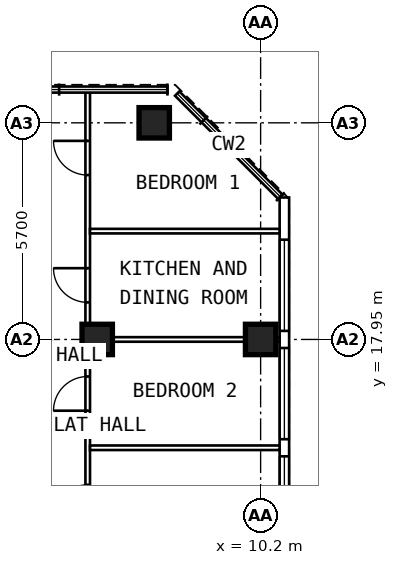
"""IFC4 building model, lengths in metres.
Left out: names, types, materials, properties, quantities, classifications, styles, units other than length and angle.
Written with IfcOpenShell. Run it as: python <this file> out.ifc"""

import sys

from ifc_helpers import new_model, si_unit, direction, frame, frame_2d, origin, origin_2d, place, context, subcontext, project, spatial, rectangle, extrude, element, fill, save


model = new_model("IFC4")
c1 = context("Model", 3, precision=1e-05, world=origin(), true_north=direction((0.0, 1.0)))
c2 = subcontext(c1, "Body", "Model", "MODEL_VIEW")
j1 = project(units=[si_unit("LENGTHUNIT", "METRE"), si_unit("PLANEANGLEUNIT", "RADIAN")], contexts=[c1])
p1 = place(None, origin())
s1 = spatial("IfcSite", under=j1, at=p1, CompositionType="ELEMENT")
p2 = place(p1, origin())
s2 = spatial("IfcBuilding", under=s1, at=p2, CompositionType="ELEMENT")
p3 = place(p2, frame((0.0, 0.0, 292.6)))
s3 = spatial("IfcBuildingStorey", under=s2, at=p3, CompositionType="ELEMENT", Elevation=292.6)
for number, where, z_axis, x_axis in (
    (1, (10.2, 17.95, 0.0), (0.0, 0.0, 1.0), (0.0, 1.0, 0.0)),
    (2, (7.4, 23.65, 0.0), (0.0, 0.0, 1.0), (0.0, 1.0, 0.0)),
    (3, (5.9, 17.95, 0.0), (0.0, 0.0, 1.0), (0.0, 1.0, 0.0)),
):
    element("IfcColumn", number, at=place(p3, frame(where, z_axis=z_axis, x_axis=x_axis)), inside=s3, PredefinedType="COLUMN", context=c2, shape_type="SweptSolid", body=[
        extrude(rectangle(XDim=0.8, YDim=0.8, at=origin_2d()), origin(), (0.0, 0.0, 1.0), 3.6),
    ])
p4 = place(p3, frame((10.825, 6.409, 0.0), z_axis=(0.0, 0.0, 1.0), x_axis=(0.0, 1.0, 0.0)))
e4 = element("IfcWall", 4, at=p4, inside=s3, PredefinedType="SOLIDWALL", context=c2, shape_type="SweptSolid", body=[
    extrude(rectangle(XDim=15.276, YDim=0.25, at=frame_2d((7.638, 0.0))), origin(), (0.0, 0.0, 1.0), 3.35),
])
p5 = place(p4, frame((0.366, 0.0, 0.6)))
e5 = element("IfcOpeningElement", 5, at=p5, cuts=e4, PredefinedType="OPENING", context=c2, shape_type="SweptSolid", body=[
    extrude(rectangle(XDim=2.4, YDim=2.0, at=frame_2d((1.2, 1.0))), frame((0.0, 0.137, 0.0), z_axis=(0.0, -1.0, 0.0), x_axis=(1.0, 0.0, 0.0)), (0.0, 0.0, 1.0), 0.274),
])
p6 = place(p4, frame((3.216, 0.0, 0.6)))
e6 = element("IfcOpeningElement", 6, at=p6, cuts=e4, PredefinedType="OPENING", context=c2, shape_type="SweptSolid", body=[
    extrude(rectangle(XDim=2.4, YDim=2.0, at=frame_2d((1.2, 1.0))), frame((0.0, 0.137, 0.0), z_axis=(0.0, -1.0, 0.0), x_axis=(1.0, 0.0, 0.0)), (0.0, 0.0, 1.0), 0.274),
])
p7 = place(p4, frame((6.066, 0.0, 0.6)))
e7 = element("IfcOpeningElement", 7, at=p7, cuts=e4, PredefinedType="OPENING", context=c2, shape_type="SweptSolid", body=[
    extrude(rectangle(XDim=2.4, YDim=2.0, at=frame_2d((1.2, 1.0))), frame((0.0, 0.137, 0.0), z_axis=(0.0, -1.0, 0.0), x_axis=(1.0, 0.0, 0.0)), (0.0, 0.0, 1.0), 0.274),
])
p8 = place(p4, frame((8.916, 0.0, 0.6)))
e8 = element("IfcOpeningElement", 8, at=p8, cuts=e4, PredefinedType="OPENING", context=c2, shape_type="SweptSolid", body=[
    extrude(rectangle(XDim=2.4, YDim=2.0, at=frame_2d((1.2, 1.0))), frame((0.0, 0.137, 0.0), z_axis=(0.0, -1.0, 0.0), x_axis=(1.0, 0.0, 0.0)), (0.0, 0.0, 1.0), 0.274),
])
p9 = place(p4, frame((11.766, 0.0, 0.6)))
e9 = element("IfcOpeningElement", 9, at=p9, cuts=e4, PredefinedType="OPENING", context=c2, shape_type="SweptSolid", body=[
    extrude(rectangle(XDim=2.4, YDim=2.0, at=frame_2d((1.2, 1.0))), frame((0.0, 0.137, 0.0), z_axis=(0.0, -1.0, 0.0), x_axis=(1.0, 0.0, 0.0)), (0.0, 0.0, 1.0), 0.274),
])
p10 = place(p3, frame((5.65, 9.6, 0.0), z_axis=(0.0, 0.0, 1.0), x_axis=(0.0, 1.0, 0.0)))
e10 = element("IfcWall", 10, at=p10, inside=s3, PredefinedType="PARTITIONING", context=c2, shape_type="SweptSolid", body=[
    extrude(rectangle(XDim=14.845, YDim=0.12, at=frame_2d((7.422, 0.0))), origin(), (0.0, 0.0, 1.0), 3.35),
])
p11 = place(p10, frame((1.075, 0.0, 0.0)))
e11 = element("IfcOpeningElement", 11, at=p11, cuts=e10, PredefinedType="OPENING", context=c2, shape_type="SweptSolid", body=[
    extrude(rectangle(XDim=0.9, YDim=2.1, at=frame_2d((0.45, 1.05))), frame((0.0, 0.072, 0.0), z_axis=(0.0, -1.0, 0.0), x_axis=(1.0, 0.0, 0.0)), (0.0, 0.0, 1.0), 0.144),
])
p12 = place(p10, frame((3.625, 0.0, 0.0)))
e12 = element("IfcOpeningElement", 12, at=p12, cuts=e10, PredefinedType="OPENING", context=c2, shape_type="SweptSolid", body=[
    extrude(rectangle(XDim=0.9, YDim=2.1, at=frame_2d((0.45, 1.05))), frame((0.0, 0.072, 0.0), z_axis=(0.0, -1.0, 0.0), x_axis=(1.0, 0.0, 0.0)), (0.0, 0.0, 1.0), 0.144),
])
p13 = place(p10, frame((6.475, 0.0, 0.0)))
e13 = element("IfcOpeningElement", 13, at=p13, cuts=e10, PredefinedType="OPENING", context=c2, shape_type="SweptSolid", body=[
    extrude(rectangle(XDim=0.9, YDim=2.1, at=frame_2d((0.45, 1.05))), frame((0.0, 0.072, 0.0), z_axis=(0.0, -1.0, 0.0), x_axis=(1.0, 0.0, 0.0)), (0.0, 0.0, 1.0), 0.144),
])
p14 = place(p10, frame((9.325, 0.0, 0.0)))
e14 = element("IfcOpeningElement", 14, at=p14, cuts=e10, PredefinedType="OPENING", context=c2, shape_type="SweptSolid", body=[
    extrude(rectangle(XDim=0.9, YDim=2.1, at=frame_2d((0.45, 1.05))), frame((0.0, 0.072, 0.0), z_axis=(0.0, -1.0, 0.0), x_axis=(1.0, 0.0, 0.0)), (0.0, 0.0, 1.0), 0.144),
])
p15 = place(p10, frame((12.675, 0.0, 0.0)))
e15 = element("IfcOpeningElement", 15, at=p15, cuts=e10, PredefinedType="OPENING", context=c2, shape_type="SweptSolid", body=[
    extrude(rectangle(XDim=0.9, YDim=2.1, at=frame_2d((0.45, 1.05))), frame((0.0, 0.072, 0.0), z_axis=(0.0, -1.0, 0.0), x_axis=(1.0, 0.0, 0.0)), (0.0, 0.0, 1.0), 0.144),
])
p16 = place(p3, frame((5.71, 15.1, 0.0), z_axis=(0.0, 0.0, 1.0), x_axis=(1.0, 0.0, 0.0)))
e16 = element("IfcWall", 16, at=p16, inside=s3, PredefinedType="PARTITIONING", context=c2, shape_type="SweptSolid", body=[
    extrude(rectangle(XDim=4.99, YDim=0.12, at=frame_2d((2.495, 0.0))), origin(), (0.0, 0.0, 1.0), 3.35),
])
p17 = place(p3, frame((5.71, 17.95, 0.0), z_axis=(0.0, 0.0, 1.0), x_axis=(1.0, 0.0, 0.0)))
e17 = element("IfcWall", 17, at=p17, inside=s3, PredefinedType="PARTITIONING", context=c2, shape_type="SweptSolid", body=[
    extrude(rectangle(XDim=4.99, YDim=0.12, at=frame_2d((2.495, 0.0))), origin(), (0.0, 0.0, 1.0), 2.45),
])
p18 = place(p3, frame((5.71, 20.8, 0.0), z_axis=(0.0, 0.0, 1.0), x_axis=(1.0, 0.0, 0.0)))
e18 = element("IfcWall", 18, at=p18, inside=s3, PredefinedType="PARTITIONING", context=c2, shape_type="SweptSolid", body=[
    extrude(rectangle(XDim=4.99, YDim=0.12, at=frame_2d((2.495, 0.0))), origin(), (0.0, 0.0, 1.0), 3.35),
])
p19 = place(p7, origin())
e19 = element("IfcWindow", 19, at=p19, inside=s3, PartitioningType="SINGLE_PANEL", PredefinedType="WINDOW", context=c2, shape_type="SweptSolid", body=[
    extrude(rectangle(XDim=2.4, YDim=2.0, at=frame_2d((1.2, 1.0))), frame((0.0, 0.03, 0.0), z_axis=(0.0, -1.0, 0.0), x_axis=(1.0, 0.0, 0.0)), (0.0, 0.0, 1.0), 0.06),
])
fill(e7, e19)
p20 = place(p8, origin())
e20 = element("IfcWindow", 20, at=p20, inside=s3, PartitioningType="SINGLE_PANEL", PredefinedType="WINDOW", context=c2, shape_type="SweptSolid", body=[
    extrude(rectangle(XDim=2.4, YDim=2.0, at=frame_2d((1.2, 1.0))), frame((0.0, 0.03, 0.0), z_axis=(0.0, -1.0, 0.0), x_axis=(1.0, 0.0, 0.0)), (0.0, 0.0, 1.0), 0.06),
])
fill(e8, e20)
p21 = place(p9, origin())
e21 = element("IfcWindow", 21, at=p21, inside=s3, PartitioningType="SINGLE_PANEL", PredefinedType="WINDOW", context=c2, shape_type="SweptSolid", body=[
    extrude(rectangle(XDim=2.4, YDim=2.0, at=frame_2d((1.2, 1.0))), frame((0.0, 0.03, 0.0), z_axis=(0.0, -1.0, 0.0), x_axis=(1.0, 0.0, 0.0)), (0.0, 0.0, 1.0), 0.06),
])
fill(e9, e21)
p22 = place(p12, origin())
e22 = element("IfcDoor", 22, at=p22, inside=s3, OperationType="SINGLE_SWING_LEFT", PredefinedType="DOOR", context=c2, shape_type="SweptSolid", body=[
    extrude(rectangle(XDim=0.9, YDim=2.1, at=frame_2d((0.45, 1.05))), frame((0.0, 0.025, 0.0), z_axis=(0.0, -1.0, 0.0), x_axis=(1.0, 0.0, 0.0)), (0.0, 0.0, 1.0), 0.05),
])
fill(e12, e22)
p23 = place(p13, origin())
e23 = element("IfcDoor", 23, at=p23, inside=s3, OperationType="SINGLE_SWING_LEFT", PredefinedType="DOOR", context=c2, shape_type="SweptSolid", body=[
    extrude(rectangle(XDim=0.9, YDim=2.1, at=frame_2d((0.45, 1.05))), frame((0.0, 0.025, 0.0), z_axis=(0.0, -1.0, 0.0), x_axis=(1.0, 0.0, 0.0)), (0.0, 0.0, 1.0), 0.05),
])
fill(e13, e23)
p24 = place(p14, origin())
e24 = element("IfcDoor", 24, at=p24, inside=s3, OperationType="SINGLE_SWING_RIGHT", PredefinedType="DOOR", context=c2, shape_type="SweptSolid", body=[
    extrude(rectangle(XDim=0.9, YDim=2.1, at=frame_2d((0.45, 1.05))), frame((0.0, 0.025, 0.0), z_axis=(0.0, -1.0, 0.0), x_axis=(1.0, 0.0, 0.0)), (0.0, 0.0, 1.0), 0.05),
])
fill(e14, e24)
p25 = place(p15, origin())
e25 = element("IfcDoor", 25, at=p25, inside=s3, OperationType="SINGLE_SWING_RIGHT", PredefinedType="DOOR", context=c2, shape_type="SweptSolid", body=[
    extrude(rectangle(XDim=0.9, YDim=2.1, at=frame_2d((0.45, 1.05))), frame((0.0, 0.025, 0.0), z_axis=(0.0, -1.0, 0.0), x_axis=(1.0, 0.0, 0.0)), (0.0, 0.0, 1.0), 0.05),
])
fill(e15, e25)
save(model, sys.argv[1])
